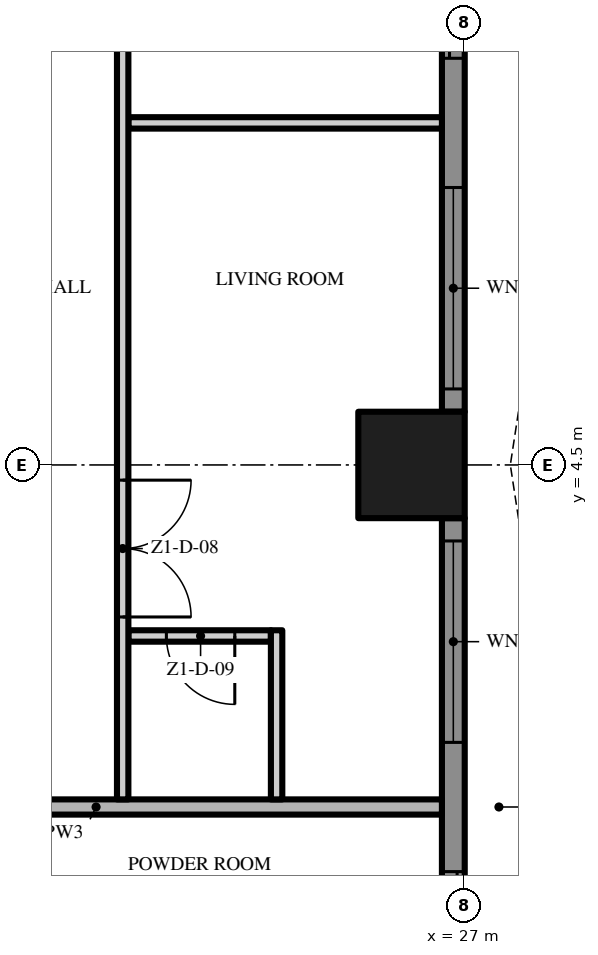
"""IFC4 building model, lengths in metres.
Left out: names, types, materials, properties, quantities, classifications, styles, units other than length and angle.
Written with IfcOpenShell. Run it as: python <this file> out.ifc"""

import sys

from ifc_helpers import new_model, si_unit, direction, frame, frame_2d, origin, origin_2d, place, context, subcontext, project, spatial, polyline, rectangle, outline, extrude, element, fill, save


model = new_model("IFC4")
c1 = context("Model", 3, precision=1e-05, world=origin(), true_north=direction((0.0, 1.0)))
c2 = subcontext(c1, "Body", "Model", "MODEL_VIEW")
j1 = project(units=[si_unit("LENGTHUNIT", "METRE"), si_unit("PLANEANGLEUNIT", "RADIAN")], contexts=[c1])
p1 = place(None, origin())
s1 = spatial("IfcSite", under=j1, at=p1, CompositionType="ELEMENT")
p2 = place(p1, origin())
s2 = spatial("IfcBuilding", under=s1, at=p2, CompositionType="ELEMENT")
p3 = place(p2, frame((0.0, 0.0, 53.0)))
s3 = spatial("IfcBuildingStorey", under=s2, at=p3, CompositionType="ELEMENT", Elevation=53.0)
p4 = place(p3, frame((26.3, 4.5, 0.0), z_axis=(0.0, 0.0, 1.0), x_axis=(1.0, 0.0, 0.0)))
e1 = element("IfcColumn", 1, at=p4, inside=s3, PredefinedType="COLUMN", context=c2, shape_type="SweptSolid", body=[
    extrude(rectangle(XDim=1.4, YDim=1.4, at=origin_2d()), origin(), (0.0, 0.0, 1.0), 3.5),
])
p5 = place(p3, frame((26.85, 3.8, 0.0), z_axis=(0.0, 0.0, 1.0), x_axis=(0.0, -1.0, 0.0)))
e2 = element("IfcWall", 2, at=p5, inside=s3, PredefinedType="SOLIDWALL", context=c2, shape_type="SweptSolid", body=[
    extrude(rectangle(XDim=7.6, YDim=0.3, at=frame_2d((3.8, 0.0))), origin(), (0.0, 0.0, 1.0), 3.5),
])
p6 = place(p5, frame((4.65, 0.0, 0.0)))
e3 = element("IfcOpeningElement", 3, at=p6, cuts=e2, PredefinedType="OPENING", context=c2, shape_type="SweptSolid", body=[
    extrude(rectangle(XDim=2.65, YDim=2.4, at=frame_2d((1.325, 1.2))), frame((0.0, 0.16, 0.0), z_axis=(0.0, -1.0, 0.0), x_axis=(1.0, 0.0, 0.0)), (0.0, 0.0, 1.0), 0.32),
])
p7 = place(p5, frame((0.3, 0.0, 0.45)))
e4 = element("IfcOpeningElement", 4, at=p7, cuts=e2, PredefinedType="OPENING", context=c2, shape_type="SweptSolid", body=[
    extrude(rectangle(XDim=2.65, YDim=2.65, at=frame_2d((1.325, 1.325))), frame((0.0, 0.16, 0.0), z_axis=(0.0, -1.0, 0.0), x_axis=(1.0, 0.0, 0.0)), (0.0, 0.0, 1.0), 0.32),
])
p8 = place(p3, frame((26.85, 12.8, 0.0), z_axis=(0.0, 0.0, 1.0), x_axis=(0.0, -1.0, 0.0)))
e5 = element("IfcWall", 5, at=p8, inside=s3, PredefinedType="SOLIDWALL", context=c2, shape_type="SweptSolid", body=[
    extrude(rectangle(XDim=7.6, YDim=0.3, at=frame_2d((3.8, 0.0))), origin(), (0.0, 0.0, 1.0), 3.5),
])
p9 = place(p8, frame((4.65, 0.0, 0.45)))
e6 = element("IfcOpeningElement", 6, at=p9, cuts=e5, PredefinedType="OPENING", context=c2, shape_type="SweptSolid", body=[
    extrude(rectangle(XDim=2.65, YDim=2.65, at=frame_2d((1.325, 1.325))), frame((0.0, 0.16, 0.0), z_axis=(0.0, -1.0, 0.0), x_axis=(1.0, 0.0, 0.0)), (0.0, 0.0, 1.0), 0.32),
])
p10 = place(p8, frame((0.3, 0.0, 0.0)))
e7 = element("IfcOpeningElement", 7, at=p10, cuts=e5, PredefinedType="OPENING", context=c2, shape_type="SweptSolid", body=[
    extrude(rectangle(XDim=2.65, YDim=2.4, at=frame_2d((1.325, 1.2))), frame((0.0, 0.16, 0.0), z_axis=(0.0, -1.0, 0.0), x_axis=(1.0, 0.0, 0.0)), (0.0, 0.0, 1.0), 0.32),
])
p11 = place(p3, origin())
e8 = element("IfcWall", 8, at=p11, inside=s3, PredefinedType="USERDEFINED", context=c2, shape_type="SweptSolid", body=[
    extrude(outline(polyline([(30.0, -18.0), (29.771, -16.5), (29.171, -15.0), (28.429, -13.5), (27.829, -12.0), (27.6, -10.5), (27.829, -9.0), (28.429, -7.5), (29.171, -6.0), (29.771, -4.5), (30.0, -3.0), (29.771, -1.5), (29.171, 0.0), (28.429, 1.5), (27.829, 3.0), (27.6, 4.5), (27.829, 6.0), (28.429, 7.5), (29.171, 9.0), (29.771, 10.5), (30.0, 12.0), (29.771, 13.5), (29.171, 15.0), (28.429, 16.5), (27.829, 18.0), (27.597, 17.907), (28.201, 16.398), (28.942, 14.898), (29.528, 13.434), (29.747, 12.0), (29.528, 10.566), (28.942, 9.102), (28.201, 7.602), (27.586, 6.066), (27.347, 4.5), (27.586, 2.934), (28.201, 1.398), (28.942, -0.102), (29.528, -1.566), (29.747, -3.0), (29.528, -4.434), (28.942, -5.898), (28.201, -7.398), (27.586, -8.934), (27.347, -10.5), (27.586, -12.066), (28.201, -13.602), (28.942, -15.102), (29.528, -16.566), (29.753, -18.038), (30.0, -18.0)])), origin(), (0.0, 0.0, 1.0), 0.9),
])
p12 = place(p3, frame((17.6, 0.0, 0.0), z_axis=(0.0, 0.0, 1.0), x_axis=(1.0, 0.0, 0.0)))
e9 = element("IfcWall", 9, at=p12, inside=s3, PredefinedType="PARTITIONING", context=c2, shape_type="SweptSolid", body=[
    extrude(rectangle(XDim=9.1, YDim=0.2, at=frame_2d((4.55, 0.0))), origin(), (0.0, 0.0, 1.0), 3.5),
])
p13 = place(p3, frame((24.45, 2.25, 0.0), z_axis=(0.0, 0.0, 1.0), x_axis=(-1.0, 0.0, 0.0)))
e10 = element("IfcWall", 10, at=p13, inside=s3, PredefinedType="PARTITIONING", context=c2, shape_type="SweptSolid", body=[
    extrude(rectangle(XDim=1.875, YDim=0.15, at=frame_2d((0.938, 0.0))), origin(), (0.0, 0.0, 1.0), 3.5),
])
p14 = place(p13, frame((0.475, 0.0, 0.0)))
e11 = element("IfcOpeningElement", 11, at=p14, cuts=e10, PredefinedType="OPENING", context=c2, shape_type="SweptSolid", body=[
    extrude(rectangle(XDim=0.9, YDim=2.1, at=frame_2d((0.45, 1.05))), frame((0.0, 0.085, 0.0), z_axis=(0.0, -1.0, 0.0), x_axis=(1.0, 0.0, 0.0)), (0.0, 0.0, 1.0), 0.17),
])
p15 = place(p3, frame((22.575, 9.0, 0.0), z_axis=(0.0, 0.0, 1.0), x_axis=(1.0, 0.0, 0.0)))
e12 = element("IfcWall", 12, at=p15, inside=s3, PredefinedType="PARTITIONING", context=c2, shape_type="SweptSolid", body=[
    extrude(rectangle(XDim=4.125, YDim=0.15, at=frame_2d((2.062, 0.0))), origin(), (0.0, 0.0, 1.0), 3.5),
])
p16 = place(p3, frame((22.5, 17.3, 0.0), z_axis=(0.0, 0.0, 1.0), x_axis=(0.0, -1.0, 0.0)))
e13 = element("IfcWall", 13, at=p16, inside=s3, PredefinedType="PARTITIONING", context=c2, shape_type="SweptSolid", body=[
    extrude(rectangle(XDim=17.2, YDim=0.15, at=frame_2d((8.6, 0.0))), origin(), (0.0, 0.0, 1.0), 3.5),
])
p17 = place(p16, frame((13.0, 0.0, 0.0)))
e14 = element("IfcOpeningElement", 14, at=p17, cuts=e13, PredefinedType="OPENING", context=c2, shape_type="SweptSolid", body=[
    extrude(rectangle(XDim=1.8, YDim=2.4, at=frame_2d((0.9, 1.2))), frame((0.0, 0.085, 0.0), z_axis=(0.0, -1.0, 0.0), x_axis=(1.0, 0.0, 0.0)), (0.0, 0.0, 1.0), 0.17),
])
p18 = place(p16, frame((5.55, 0.0, 0.0)))
e15 = element("IfcOpeningElement", 15, at=p18, cuts=e13, PredefinedType="OPENING", context=c2, shape_type="SweptSolid", body=[
    extrude(rectangle(XDim=1.0, YDim=2.4, at=frame_2d((0.5, 1.2))), frame((0.0, 0.085, 0.0), z_axis=(0.0, -1.0, 0.0), x_axis=(1.0, 0.0, 0.0)), (0.0, 0.0, 1.0), 0.17),
])
p19 = place(p16, frame((0.15, 0.0, 0.0)))
e16 = element("IfcOpeningElement", 16, at=p19, cuts=e13, PredefinedType="OPENING", context=c2, shape_type="SweptSolid", body=[
    extrude(rectangle(XDim=1.0, YDim=2.4, at=frame_2d((0.5, 1.2))), frame((0.0, 0.085, 0.0), z_axis=(0.0, -1.0, 0.0), x_axis=(1.0, 0.0, 0.0)), (0.0, 0.0, 1.0), 0.17),
])
p20 = place(p3, frame((24.525, 0.1, 0.0), z_axis=(0.0, 0.0, 1.0), x_axis=(0.0, 1.0, 0.0)))
e17 = element("IfcWall", 17, at=p20, inside=s3, PredefinedType="PARTITIONING", context=c2, shape_type="SweptSolid", body=[
    extrude(rectangle(XDim=2.225, YDim=0.15, at=frame_2d((1.113, 0.0))), origin(), (0.0, 0.0, 1.0), 3.5),
])
p21 = place(p6, origin())
e18 = element("IfcDoor", 18, at=p21, inside=s3, OperationType="SINGLE_SWING_LEFT", PredefinedType="DOOR", context=c2, shape_type="SweptSolid", body=[
    extrude(rectangle(XDim=2.65, YDim=2.4, at=frame_2d((1.325, 1.2))), frame((0.0, 0.025, 0.0), z_axis=(0.0, -1.0, 0.0), x_axis=(1.0, 0.0, 0.0)), (0.0, 0.0, 1.0), 0.05),
])
fill(e3, e18)
p22 = place(p7, origin())
e19 = element("IfcWindow", 19, at=p22, inside=s3, PartitioningType="SINGLE_PANEL", PredefinedType="WINDOW", context=c2, shape_type="SweptSolid", body=[
    extrude(rectangle(XDim=2.65, YDim=2.65, at=frame_2d((1.325, 1.325))), frame((0.0, 0.03, 0.0), z_axis=(0.0, -1.0, 0.0), x_axis=(1.0, 0.0, 0.0)), (0.0, 0.0, 1.0), 0.06),
])
fill(e4, e19)
p23 = place(p9, origin())
e20 = element("IfcWindow", 20, at=p23, inside=s3, PartitioningType="SINGLE_PANEL", PredefinedType="WINDOW", context=c2, shape_type="SweptSolid", body=[
    extrude(rectangle(XDim=2.65, YDim=2.65, at=frame_2d((1.325, 1.325))), frame((0.0, 0.03, 0.0), z_axis=(0.0, -1.0, 0.0), x_axis=(1.0, 0.0, 0.0)), (0.0, 0.0, 1.0), 0.06),
])
fill(e6, e20)
p24 = place(p10, origin())
e21 = element("IfcDoor", 21, at=p24, inside=s3, OperationType="SINGLE_SWING_LEFT", PredefinedType="DOOR", context=c2, shape_type="SweptSolid", body=[
    extrude(rectangle(XDim=2.65, YDim=2.4, at=frame_2d((1.325, 1.2))), frame((0.0, 0.025, 0.0), z_axis=(0.0, -1.0, 0.0), x_axis=(1.0, 0.0, 0.0)), (0.0, 0.0, 1.0), 0.05),
])
fill(e7, e21)
p25 = place(p17, origin())
e22 = element("IfcDoor", 22, at=p25, inside=s3, OperationType="DOUBLE_DOOR_SINGLE_SWING", PredefinedType="DOOR", context=c2, shape_type="SweptSolid", body=[
    extrude(rectangle(XDim=1.8, YDim=2.4, at=frame_2d((0.9, 1.2))), frame((0.0, 0.025, 0.0), z_axis=(0.0, -1.0, 0.0), x_axis=(1.0, 0.0, 0.0)), (0.0, 0.0, 1.0), 0.05),
])
fill(e14, e22)
p26 = place(p14, origin())
e23 = element("IfcDoor", 23, at=p26, inside=s3, OperationType="SINGLE_SWING_LEFT", PredefinedType="DOOR", context=c2, shape_type="SweptSolid", body=[
    extrude(rectangle(XDim=0.9, YDim=2.1, at=frame_2d((0.45, 1.05))), frame((0.0, 0.025, 0.0), z_axis=(0.0, -1.0, 0.0), x_axis=(1.0, 0.0, 0.0)), (0.0, 0.0, 1.0), 0.05),
])
fill(e11, e23)
save(model, sys.argv[1])
